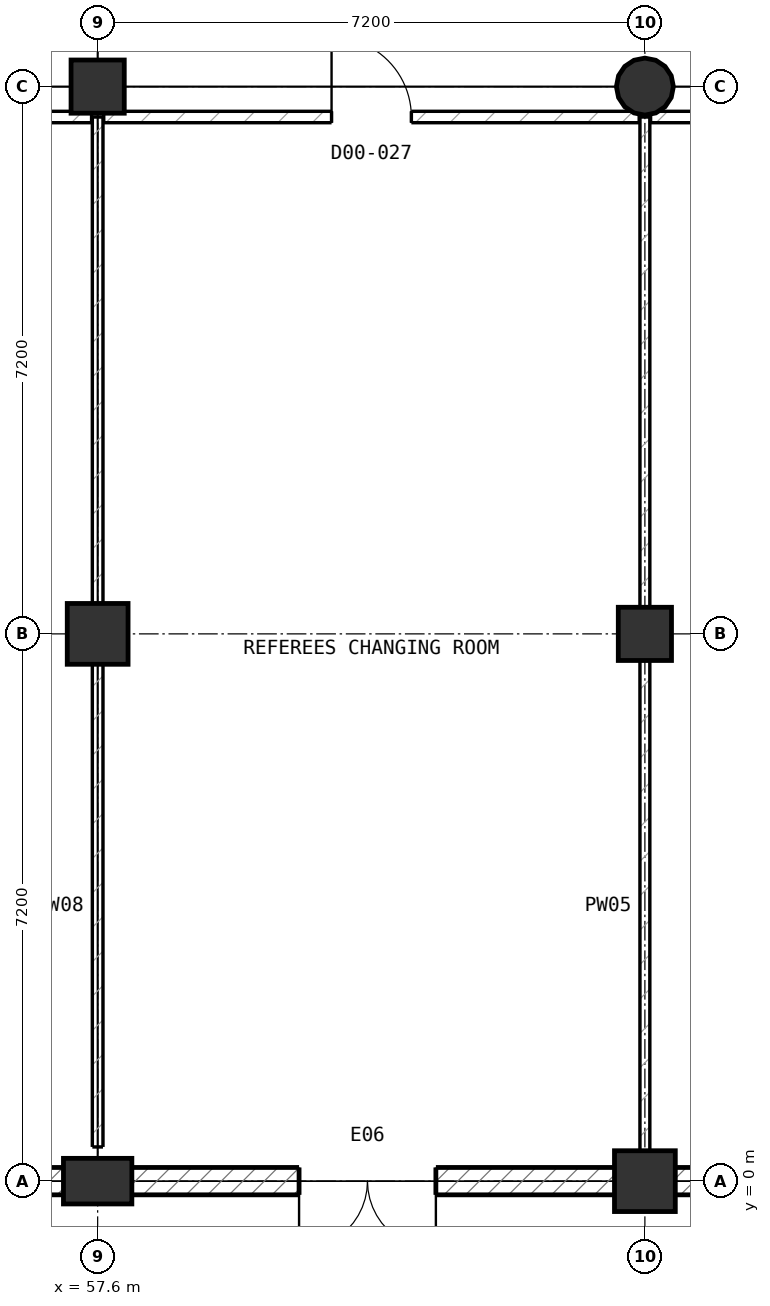
"""IFC4 building model, lengths in metres.
Left out: names, types, materials, properties, quantities, classifications, styles, units other than length and angle.
Written with IfcOpenShell. Run it as: python <this file> out.ifc"""

import sys

from ifc_helpers import new_model, si_unit, direction, frame, frame_2d, origin, origin_2d, place, context, subcontext, project, spatial, rectangle, circle, extrude, element, fill, save


model = new_model("IFC4")
c1 = context("Model", 3, precision=1e-05, world=origin(), true_north=direction((0.0, 1.0)))
c2 = subcontext(c1, "Body", "Model", "MODEL_VIEW")
j1 = project(units=[si_unit("LENGTHUNIT", "METRE"), si_unit("PLANEANGLEUNIT", "RADIAN")], contexts=[c1])
p1 = place(None, origin())
s1 = spatial("IfcSite", under=j1, at=p1, CompositionType="ELEMENT")
p2 = place(p1, origin())
s2 = spatial("IfcBuilding", under=s1, at=p2, CompositionType="ELEMENT")
p3 = place(p2, origin())
s3 = spatial("IfcBuildingStorey", under=s2, at=p3, CompositionType="ELEMENT", Elevation=0.0)
p4 = place(p3, frame((57.6, 0.0, 0.0), z_axis=(0.0, 0.0, 1.0), x_axis=(1.0, 0.0, 0.0)))
e1 = element("IfcColumn", 1, at=p4, inside=s3, PredefinedType="COLUMN", context=c2, shape_type="SweptSolid", body=[
    extrude(rectangle(XDim=0.6, YDim=0.9, at=origin_2d()), origin(), (0.0, 0.0, 1.0), 5.6),
])
p5 = place(p3, frame((57.6, 7.2, 0.0), z_axis=(0.0, 0.0, 1.0), x_axis=(1.0, 0.0, 0.0)))
e2 = element("IfcColumn", 2, at=p5, inside=s3, PredefinedType="COLUMN", context=c2, shape_type="SweptSolid", body=[
    extrude(rectangle(XDim=0.8, YDim=0.8, at=origin_2d()), origin(), (0.0, 0.0, 1.0), 5.6),
])
p6 = place(p3, frame((57.6, 14.4, 0.0), z_axis=(0.0, 0.0, 1.0), x_axis=(1.0, 0.0, 0.0)))
e3 = element("IfcColumn", 3, at=p6, inside=s3, PredefinedType="COLUMN", context=c2, shape_type="SweptSolid", body=[
    extrude(rectangle(XDim=0.7, YDim=0.7, at=origin_2d()), origin(), (0.0, 0.0, 1.0), 5.6),
])
p7 = place(p3, frame((64.8, 0.0, 0.0), z_axis=(0.0, 0.0, 1.0), x_axis=(1.0, 0.0, 0.0)))
e4 = element("IfcColumn", 4, at=p7, inside=s3, PredefinedType="COLUMN", context=c2, shape_type="SweptSolid", body=[
    extrude(rectangle(XDim=0.8, YDim=0.8, at=origin_2d()), origin(), (0.0, 0.0, 1.0), 5.6),
])
p8 = place(p3, frame((64.8, 7.2, 0.0), z_axis=(0.0, 0.0, 1.0), x_axis=(1.0, 0.0, 0.0)))
e5 = element("IfcColumn", 5, at=p8, inside=s3, PredefinedType="COLUMN", context=c2, shape_type="SweptSolid", body=[
    extrude(rectangle(XDim=0.7, YDim=0.7, at=origin_2d()), origin(), (0.0, 0.0, 1.0), 5.6),
])
p9 = place(p3, frame((64.8, 14.4, 0.0), z_axis=(0.0, 0.0, 1.0), x_axis=(1.0, 0.0, 0.0)))
e6 = element("IfcColumn", 6, at=p9, inside=s3, PredefinedType="COLUMN", context=c2, shape_type="SweptSolid", body=[
    extrude(circle(Radius=0.375, at=origin_2d()), origin(), (0.0, 0.0, 1.0), 5.6),
])
p10 = place(p3, frame((71.665, 0.0, 0.0), z_axis=(0.0, 0.0, 1.0), x_axis=(-1.0, 0.0, 0.0)))
e7 = element("IfcWall", 7, at=p10, inside=s3, PredefinedType="SOLIDWALL", context=c2, shape_type="SweptSolid", body=[
    extrude(rectangle(XDim=6.48, YDim=0.36, at=frame_2d((3.24, 0.0))), origin(), (0.0, 0.0, 1.0), 5.6),
])
p11 = place(p10, frame((2.24, 0.0, 2.1)))
e8 = element("IfcOpeningElement", 8, at=p11, cuts=e7, PredefinedType="OPENING", context=c2, shape_type="SweptSolid", body=[
    extrude(rectangle(XDim=2.0, YDim=0.9, at=frame_2d((1.0, 0.45))), frame((0.0, 0.19, 0.0), z_axis=(0.0, -1.0, 0.0), x_axis=(1.0, 0.0, 0.0)), (0.0, 0.0, 1.0), 0.38),
])
p12 = place(p3, frame((64.415, 0.0, 0.0), z_axis=(0.0, 0.0, 1.0), x_axis=(-1.0, 0.0, 0.0)))
e9 = element("IfcWall", 9, at=p12, inside=s3, PredefinedType="SOLIDWALL", context=c2, shape_type="SweptSolid", body=[
    extrude(rectangle(XDim=6.53, YDim=0.36, at=frame_2d((3.265, 0.0))), origin(), (0.0, 0.0, 1.0), 5.6),
])
p13 = place(p12, frame((2.365, 0.0, 0.0)))
e10 = element("IfcOpeningElement", 10, at=p13, cuts=e9, PredefinedType="OPENING", context=c2, shape_type="SweptSolid", body=[
    extrude(rectangle(XDim=1.8, YDim=2.2, at=frame_2d((0.9, 1.1))), frame((0.0, 0.19, 0.0), z_axis=(0.0, -1.0, 0.0), x_axis=(1.0, 0.0, 0.0)), (0.0, 0.0, 1.0), 0.38),
])
p14 = place(p3, frame((57.315, 0.0, 0.0), z_axis=(0.0, 0.0, 1.0), x_axis=(-1.0, 0.0, 0.0)))
e11 = element("IfcWall", 11, at=p14, inside=s3, PredefinedType="SOLIDWALL", context=c2, shape_type="SweptSolid", body=[
    extrude(rectangle(XDim=6.58, YDim=0.36, at=frame_2d((3.29, 0.0))), origin(), (0.0, 0.0, 1.0), 5.6),
])
p15 = place(p14, frame((2.54, 0.0, 0.9)))
e12 = element("IfcOpeningElement", 12, at=p15, cuts=e11, PredefinedType="OPENING", context=c2, shape_type="SweptSolid", body=[
    extrude(rectangle(XDim=1.5, YDim=2.7, at=frame_2d((0.75, 1.35))), frame((0.0, 0.19, 0.0), z_axis=(0.0, -1.0, 0.0), x_axis=(1.0, 0.0, 0.0)), (0.0, 0.0, 1.0), 0.38),
])
p16 = place(p3, frame((57.6, 0.45, 0.0), z_axis=(0.0, 0.0, 1.0), x_axis=(0.0, 1.0, 0.0)))
e13 = element("IfcWall", 13, at=p16, inside=s3, PredefinedType="PARTITIONING", context=c2, shape_type="SweptSolid", body=[
    extrude(rectangle(XDim=6.35, YDim=0.14, at=frame_2d((3.175, 0.0))), origin(), (0.0, 0.0, 1.0), 4.88),
])
p17 = place(p3, frame((57.6, 7.6, 0.0), z_axis=(0.0, 0.0, 1.0), x_axis=(0.0, 1.0, 0.0)))
e14 = element("IfcWall", 14, at=p17, inside=s3, PredefinedType="PARTITIONING", context=c2, shape_type="SweptSolid", body=[
    extrude(rectangle(XDim=6.4, YDim=0.14, at=frame_2d((3.2, 0.0))), origin(), (0.0, 0.0, 1.0), 4.88),
])
p18 = place(p3, frame((64.8, 0.4, 0.0), z_axis=(0.0, 0.0, 1.0), x_axis=(0.0, 1.0, 0.0)))
e15 = element("IfcWall", 15, at=p18, inside=s3, PredefinedType="PARTITIONING", context=c2, shape_type="SweptSolid", body=[
    extrude(rectangle(XDim=6.45, YDim=0.13, at=frame_2d((3.225, 0.0))), origin(), (0.0, 0.0, 1.0), 5.3),
])
p19 = place(p3, frame((64.8, 7.55, 0.0), z_axis=(0.0, 0.0, 1.0), x_axis=(0.0, 1.0, 0.0)))
e16 = element("IfcWall", 16, at=p19, inside=s3, PredefinedType="PARTITIONING", context=c2, shape_type="SweptSolid", body=[
    extrude(rectangle(XDim=6.45, YDim=0.13, at=frame_2d((3.225, 0.0))), origin(), (0.0, 0.0, 1.0), 5.3),
])
p20 = place(p3, frame((50.8, 14.0, 0.0), z_axis=(0.0, 0.0, 1.0), x_axis=(1.0, 0.0, 0.0)))
e17 = element("IfcWall", 17, at=p20, inside=s3, PredefinedType="PARTITIONING", context=c2, shape_type="SweptSolid", body=[
    extrude(rectangle(XDim=6.72, YDim=0.15, at=frame_2d((3.36, 0.0))), origin(), (0.0, 0.0, 1.0), 5.3),
])
p21 = place(p20, frame((2.61, 0.0, 0.0)))
e18 = element("IfcOpeningElement", 18, at=p21, cuts=e17, PredefinedType="OPENING", context=c2, shape_type="SweptSolid", body=[
    extrude(rectangle(XDim=1.5, YDim=2.2, at=frame_2d((0.75, 1.1))), frame((0.0, 0.085, 0.0), z_axis=(0.0, -1.0, 0.0), x_axis=(1.0, 0.0, 0.0)), (0.0, 0.0, 1.0), 0.17),
])
p22 = place(p3, frame((57.68, 14.0, 0.0), z_axis=(0.0, 0.0, 1.0), x_axis=(1.0, 0.0, 0.0)))
e19 = element("IfcWall", 19, at=p22, inside=s3, PredefinedType="PARTITIONING", context=c2, shape_type="SweptSolid", body=[
    extrude(rectangle(XDim=7.045, YDim=0.15, at=frame_2d((3.522, 0.0))), origin(), (0.0, 0.0, 1.0), 5.3),
])
p23 = place(p22, frame((2.998, 0.0, 0.0)))
e20 = element("IfcOpeningElement", 20, at=p23, cuts=e19, PredefinedType="OPENING", context=c2, shape_type="SweptSolid", body=[
    extrude(rectangle(XDim=1.05, YDim=2.15, at=frame_2d((0.525, 1.075))), frame((0.0, 0.085, 0.0), z_axis=(0.0, -1.0, 0.0), x_axis=(1.0, 0.0, 0.0)), (0.0, 0.0, 1.0), 0.17),
])
p24 = place(p3, frame((64.875, 14.0, 0.0), z_axis=(0.0, 0.0, 1.0), x_axis=(1.0, 0.0, 0.0)))
e21 = element("IfcWall", 21, at=p24, inside=s3, PredefinedType="PARTITIONING", context=c2, shape_type="SweptSolid", body=[
    extrude(rectangle(XDim=6.725, YDim=0.15, at=frame_2d((3.363, 0.0))), origin(), (0.0, 0.0, 1.0), 5.3),
])
p25 = place(p24, frame((2.837, 0.0, 0.0)))
e22 = element("IfcOpeningElement", 22, at=p25, cuts=e21, PredefinedType="OPENING", context=c2, shape_type="SweptSolid", body=[
    extrude(rectangle(XDim=1.05, YDim=2.15, at=frame_2d((0.525, 1.075))), frame((0.0, 0.085, 0.0), z_axis=(0.0, -1.0, 0.0), x_axis=(1.0, 0.0, 0.0)), (0.0, 0.0, 1.0), 0.17),
])
p26 = place(p13, origin())
e23 = element("IfcDoor", 23, at=p26, inside=s3, OperationType="DOUBLE_DOOR_SINGLE_SWING", PredefinedType="DOOR", context=c2, shape_type="SweptSolid", body=[
    extrude(rectangle(XDim=1.8, YDim=2.2, at=frame_2d((0.9, 1.1))), frame((0.0, 0.025, 0.0), z_axis=(0.0, -1.0, 0.0), x_axis=(1.0, 0.0, 0.0)), (0.0, 0.0, 1.0), 0.05),
])
fill(e10, e23)
p27 = place(p23, origin())
e24 = element("IfcDoor", 24, at=p27, inside=s3, OperationType="SINGLE_SWING_LEFT", PredefinedType="DOOR", context=c2, shape_type="SweptSolid", body=[
    extrude(rectangle(XDim=1.05, YDim=2.15, at=frame_2d((0.525, 1.075))), frame((0.0, 0.025, 0.0), z_axis=(0.0, -1.0, 0.0), x_axis=(1.0, 0.0, 0.0)), (0.0, 0.0, 1.0), 0.05),
])
fill(e20, e24)
save(model, sys.argv[1])
